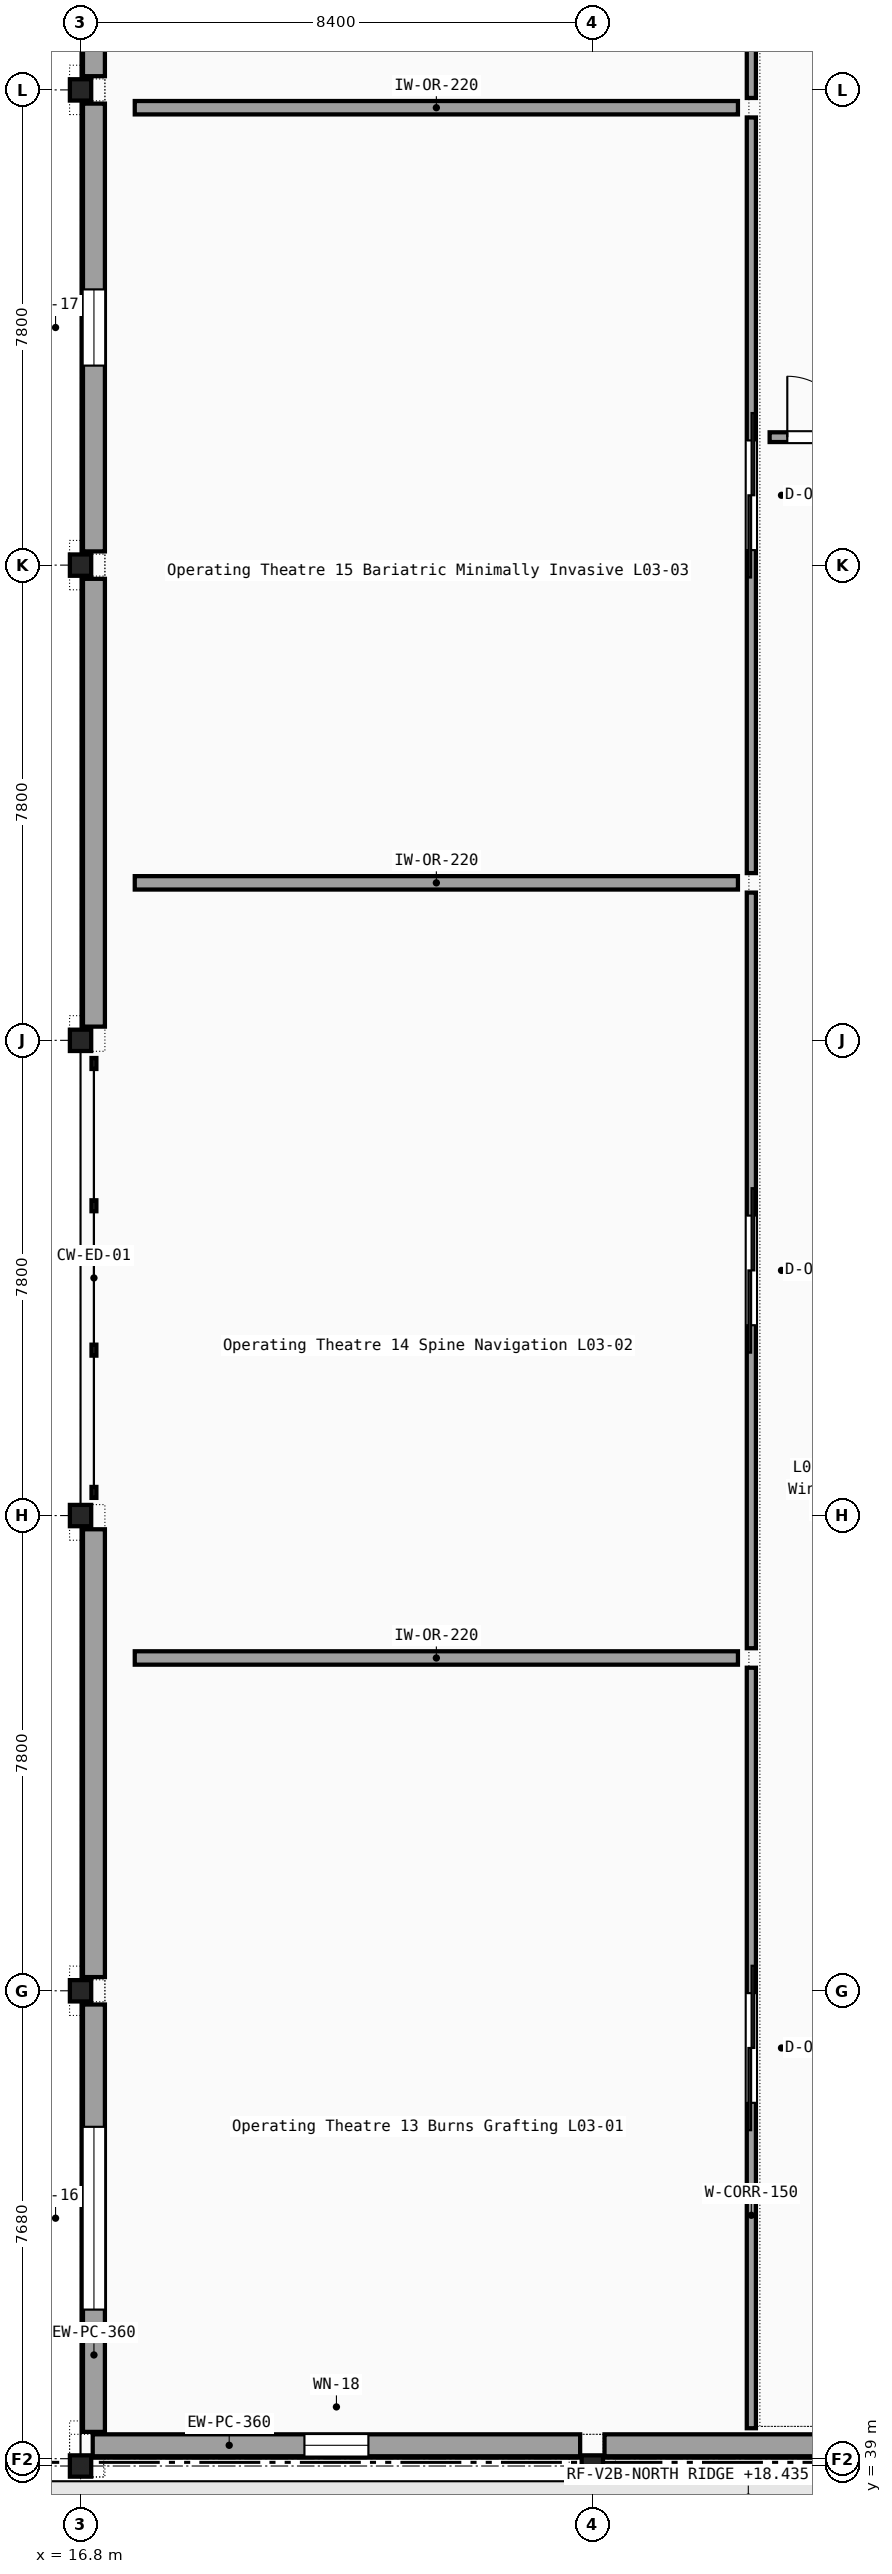
"""IFC4 building model, lengths in metres.
Left out: names, types, materials, properties, quantities, classifications, styles, units other than length and angle.
Written with IfcOpenShell. Run it as: python <this file> out.ifc"""

import sys

from ifc_helpers import new_model, si_unit, direction, frame, frame_2d, origin, origin_2d, place, context, subcontext, project, spatial, rectangle, i_section, extrude, element, fill, save


model = new_model("IFC4")
c1 = context("Model", 3, precision=1e-05, world=origin(), true_north=direction((0.0, 1.0)))
c2 = subcontext(c1, "Body", "Model", "MODEL_VIEW")
j1 = project(units=[si_unit("LENGTHUNIT", "METRE"), si_unit("PLANEANGLEUNIT", "RADIAN")], contexts=[c1])
p1 = place(None, origin())
s1 = spatial("IfcSite", under=j1, at=p1, CompositionType="ELEMENT")
p2 = place(p1, origin())
s2 = spatial("IfcBuilding", under=s1, at=p2, CompositionType="ELEMENT")
p3 = place(p2, frame((0.0, 0.0, 14.85)))
s3 = spatial("IfcBuildingStorey", under=s2, at=p3, CompositionType="ELEMENT", Elevation=14.85)
for number, where, z_axis, x_axis in (
    (1, (16.8, 39.0, 0.0), (0.0, 0.0, 1.0), (1.0, 0.0, 0.0)),
    (2, (16.8, 46.8, 0.0), (0.0, 0.0, 1.0), (1.0, 0.0, 0.0)),
    (3, (16.8, 54.6, 0.0), (0.0, 0.0, 1.0), (1.0, 0.0, 0.0)),
    (4, (16.8, 62.4, 0.0), (0.0, 0.0, 1.0), (1.0, 0.0, 0.0)),
    (5, (16.8, 70.2, 0.0), (0.0, 0.0, 1.0), (1.0, 0.0, 0.0)),
    (6, (16.8, 78.0, 0.0), (0.0, 0.0, 1.0), (1.0, 0.0, 0.0)),
    (7, (25.2, 39.0, 0.0), (0.0, 0.0, 1.0), (1.0, 0.0, 0.0)),
):
    element("IfcColumn", number, at=place(p3, frame(where, z_axis=z_axis, x_axis=x_axis)), inside=s3, PredefinedType="COLUMN", context=c2, shape_type="SweptSolid", body=[
        extrude(i_section(OverallWidth=0.3, OverallDepth=0.35, WebThickness=0.01, FlangeThickness=0.018, FilletRadius=0.027, at=origin_2d()), origin(), (0.0, 0.0, 1.0), 4.05),
    ])
p4 = place(p3, frame((17.02, 39.56, 0.0), z_axis=(0.0, 0.0, 1.0), x_axis=(0.0, 1.0, 0.0)))
e8 = element("IfcWall", 8, at=p4, inside=s3, PredefinedType="SOLIDWALL", context=c2, shape_type="SweptSolid", body=[
    extrude(rectangle(XDim=7.015, YDim=0.36, at=frame_2d((3.507, 0.0))), origin(), (0.0, 0.0, 1.0), 3.77),
])
p5 = place(p4, frame((2.008, 0.0, 0.7)))
e9 = element("IfcOpeningElement", 9, at=p5, cuts=e8, PredefinedType="OPENING", context=c2, shape_type="SweptSolid", body=[
    extrude(rectangle(XDim=3.0, YDim=1.85, at=frame_2d((1.5, 0.925))), frame((0.0, 0.19, 0.0), z_axis=(0.0, -1.0, 0.0), x_axis=(1.0, 0.0, 0.0)), (0.0, 0.0, 1.0), 0.38),
])
for number, where, z_axis, x_axis in (
    (10, (17.02, 47.025, 0.0), (0.0, 0.0, 1.0), (0.0, 1.0, 0.0)),
    (11, (17.02, 62.625, 0.0), (0.0, 0.0, 1.0), (0.0, 1.0, 0.0)),
):
    element("IfcWall", number, at=place(p3, frame(where, z_axis=z_axis, x_axis=x_axis)), inside=s3, PredefinedType="SOLIDWALL", context=c2, shape_type="SweptSolid", body=[
        extrude(rectangle(XDim=7.35, YDim=0.36, at=frame_2d((3.675, 0.0))), origin(), (0.0, 0.0, 1.0), 3.44),
    ])
p6 = place(p3, frame((17.02, 70.425, 0.0), z_axis=(0.0, 0.0, 1.0), x_axis=(0.0, 1.0, 0.0)))
e12 = element("IfcWall", 12, at=p6, inside=s3, PredefinedType="SOLIDWALL", context=c2, shape_type="SweptSolid", body=[
    extrude(rectangle(XDim=7.35, YDim=0.36, at=frame_2d((3.675, 0.0))), origin(), (0.0, 0.0, 1.0), 3.44),
])
p7 = place(p6, frame((3.05, 0.0, 0.95)))
e13 = element("IfcOpeningElement", 13, at=p7, cuts=e12, PredefinedType="OPENING", context=c2, shape_type="SweptSolid", body=[
    extrude(rectangle(XDim=1.25, YDim=1.5, at=frame_2d((0.625, 0.75))), frame((0.0, 0.19, 0.0), z_axis=(0.0, -1.0, 0.0), x_axis=(1.0, 0.0, 0.0)), (0.0, 0.0, 1.0), 0.38),
])
p8 = place(p3, frame((17.02, 78.225, 0.0), z_axis=(0.0, 0.0, 1.0), x_axis=(0.0, 1.0, 0.0)))
e14 = element("IfcWall", 14, at=p8, inside=s3, PredefinedType="SOLIDWALL", context=c2, shape_type="SweptSolid", body=[
    extrude(rectangle(XDim=7.35, YDim=0.36, at=frame_2d((3.675, 0.0))), origin(), (0.0, 0.0, 1.0), 3.77),
])
p9 = place(p3, frame((17.0, 39.34, 0.0), z_axis=(0.0, 0.0, 1.0), x_axis=(1.0, 0.0, 0.0)))
e15 = element("IfcWall", 15, at=p9, inside=s3, PredefinedType="SOLIDWALL", context=c2, shape_type="SweptSolid", body=[
    extrude(rectangle(XDim=8.0, YDim=0.36, at=frame_2d((4.0, 0.0))), origin(), (0.0, 0.0, 1.0), 3.77),
])
p10 = place(p9, frame((3.475, 0.0, 1.3)))
e16 = element("IfcOpeningElement", 16, at=p10, cuts=e15, PredefinedType="OPENING", context=c2, shape_type="SweptSolid", body=[
    extrude(rectangle(XDim=1.05, YDim=1.2, at=frame_2d((0.525, 0.6))), frame((0.0, 0.19, 0.0), z_axis=(0.0, -1.0, 0.0), x_axis=(1.0, 0.0, 0.0)), (0.0, 0.0, 1.0), 0.38),
])
p11 = place(p3, frame((25.4, 39.34, 0.0), z_axis=(0.0, 0.0, 1.0), x_axis=(1.0, 0.0, 0.0)))
e17 = element("IfcWall", 17, at=p11, inside=s3, PredefinedType="SOLIDWALL", context=c2, shape_type="SweptSolid", body=[
    extrude(rectangle(XDim=8.0, YDim=0.36, at=frame_2d((4.0, 0.0))), origin(), (0.0, 0.0, 1.0), 3.77),
])
p12 = place(p3, frame((27.81, 39.62, 0.0), z_axis=(0.0, 0.0, 1.0), x_axis=(0.0, 1.0, 0.0)))
e18 = element("IfcWall", 18, at=p12, inside=s3, PredefinedType="PARTITIONING", context=c2, shape_type="SweptSolid", body=[
    extrude(rectangle(XDim=12.482, YDim=0.15, at=frame_2d((6.241, 0.0))), origin(), (0.0, 0.0, 1.0), 3.77),
])
p13 = place(p12, frame((5.341, 0.0, 0.0)))
e19 = element("IfcOpeningElement", 19, at=p13, cuts=e18, PredefinedType="OPENING", context=c2, shape_type="SweptSolid", body=[
    extrude(rectangle(XDim=1.8, YDim=2.4, at=frame_2d((0.9, 1.2))), frame((0.0, 0.085, 0.0), z_axis=(0.0, -1.0, 0.0), x_axis=(1.0, 0.0, 0.0)), (0.0, 0.0, 1.0), 0.17),
])
p14 = place(p3, frame((17.69, 52.262, 0.0), z_axis=(0.0, 0.0, 1.0), x_axis=(1.0, 0.0, 0.0)))
e20 = element("IfcWall", 20, at=p14, inside=s3, PredefinedType="PARTITIONING", context=c2, shape_type="SweptSolid", body=[
    extrude(rectangle(XDim=9.9, YDim=0.22, at=frame_2d((4.95, 0.0))), origin(), (0.0, 0.0, 1.0), 3.77),
])
p15 = place(p3, frame((27.81, 52.423, 0.0), z_axis=(0.0, 0.0, 1.0), x_axis=(0.0, 1.0, 0.0)))
e21 = element("IfcWall", 21, at=p15, inside=s3, PredefinedType="PARTITIONING", context=c2, shape_type="SweptSolid", body=[
    extrude(rectangle(XDim=12.402, YDim=0.15, at=frame_2d((6.201, 0.0))), origin(), (0.0, 0.0, 1.0), 3.44),
])
p16 = place(p15, frame((5.301, 0.0, 0.0)))
e22 = element("IfcOpeningElement", 22, at=p16, cuts=e21, PredefinedType="OPENING", context=c2, shape_type="SweptSolid", body=[
    extrude(rectangle(XDim=1.8, YDim=2.4, at=frame_2d((0.9, 1.2))), frame((0.0, 0.085, 0.0), z_axis=(0.0, -1.0, 0.0), x_axis=(1.0, 0.0, 0.0)), (0.0, 0.0, 1.0), 0.17),
])
p17 = place(p3, frame((17.69, 64.985, 0.0), z_axis=(0.0, 0.0, 1.0), x_axis=(1.0, 0.0, 0.0)))
e23 = element("IfcWall", 23, at=p17, inside=s3, PredefinedType="PARTITIONING", context=c2, shape_type="SweptSolid", body=[
    extrude(rectangle(XDim=9.9, YDim=0.22, at=frame_2d((4.95, 0.0))), origin(), (0.0, 0.0, 1.0), 3.77),
])
p18 = place(p3, frame((27.81, 65.145, 0.0), z_axis=(0.0, 0.0, 1.0), x_axis=(0.0, 1.0, 0.0)))
e24 = element("IfcWall", 24, at=p18, inside=s3, PredefinedType="PARTITIONING", context=c2, shape_type="SweptSolid", body=[
    extrude(rectangle(XDim=12.403, YDim=0.15, at=frame_2d((6.201, 0.0))), origin(), (0.0, 0.0, 1.0), 3.44),
])
p19 = place(p18, frame((5.301, 0.0, 0.0)))
e25 = element("IfcOpeningElement", 25, at=p19, cuts=e24, PredefinedType="OPENING", context=c2, shape_type="SweptSolid", body=[
    extrude(rectangle(XDim=1.8, YDim=2.4, at=frame_2d((0.9, 1.2))), frame((0.0, 0.085, 0.0), z_axis=(0.0, -1.0, 0.0), x_axis=(1.0, 0.0, 0.0)), (0.0, 0.0, 1.0), 0.17),
])
p20 = place(p3, frame((17.69, 77.708, 0.0), z_axis=(0.0, 0.0, 1.0), x_axis=(1.0, 0.0, 0.0)))
e26 = element("IfcWall", 26, at=p20, inside=s3, PredefinedType="PARTITIONING", context=c2, shape_type="SweptSolid", body=[
    extrude(rectangle(XDim=9.9, YDim=0.22, at=frame_2d((4.95, 0.0))), origin(), (0.0, 0.0, 1.0), 3.77),
])
p21 = place(p3, frame((27.81, 77.867, 0.0), z_axis=(0.0, 0.0, 1.0), x_axis=(0.0, 1.0, 0.0)))
e27 = element("IfcWall", 27, at=p21, inside=s3, PredefinedType="PARTITIONING", context=c2, shape_type="SweptSolid", body=[
    extrude(rectangle(XDim=12.483, YDim=0.15, at=frame_2d((6.241, 0.0))), origin(), (0.0, 0.0, 1.0), 3.77),
])
p22 = place(p21, frame((5.341, 0.0, 0.0)))
e28 = element("IfcOpeningElement", 28, at=p22, cuts=e27, PredefinedType="OPENING", context=c2, shape_type="SweptSolid", body=[
    extrude(rectangle(XDim=1.8, YDim=2.4, at=frame_2d((0.9, 1.2))), frame((0.0, 0.085, 0.0), z_axis=(0.0, -1.0, 0.0), x_axis=(1.0, 0.0, 0.0)), (0.0, 0.0, 1.0), 0.17),
])
p23 = place(p3, frame((28.11, 72.3, 0.0), z_axis=(0.0, 0.0, 1.0), x_axis=(1.0, 0.0, 0.0)))
e29 = element("IfcWall", 29, at=p23, inside=s3, PredefinedType="PARTITIONING", context=c2, shape_type="SweptSolid", body=[
    extrude(rectangle(XDim=2.58, YDim=0.16, at=frame_2d((1.29, 0.0))), origin(), (0.0, 0.0, 1.0), 3.77),
])
p24 = place(p23, frame((0.29, 0.0, 0.0)))
e30 = element("IfcOpeningElement", 30, at=p24, cuts=e29, PredefinedType="OPENING", context=c2, shape_type="SweptSolid", body=[
    extrude(rectangle(XDim=2.0, YDim=2.3, at=frame_2d((1.0, 1.15))), frame((0.0, 0.09, 0.0), z_axis=(0.0, -1.0, 0.0), x_axis=(1.0, 0.0, 0.0)), (0.0, 0.0, 1.0), 0.18),
])
p25 = place(p5, origin())
e31 = element("IfcWindow", 31, at=p25, inside=s3, PartitioningType="SINGLE_PANEL", PredefinedType="WINDOW", context=c2, shape_type="SweptSolid", body=[
    extrude(rectangle(XDim=3.0, YDim=1.85, at=frame_2d((1.5, 0.925))), frame((0.0, 0.03, 0.0), z_axis=(0.0, -1.0, 0.0), x_axis=(1.0, 0.0, 0.0)), (0.0, 0.0, 1.0), 0.06),
])
fill(e9, e31)
p26 = place(p7, origin())
e32 = element("IfcWindow", 32, at=p26, inside=s3, PartitioningType="SINGLE_PANEL", PredefinedType="WINDOW", context=c2, shape_type="SweptSolid", body=[
    extrude(rectangle(XDim=1.25, YDim=1.5, at=frame_2d((0.625, 0.75))), frame((0.0, 0.03, 0.0), z_axis=(0.0, -1.0, 0.0), x_axis=(1.0, 0.0, 0.0)), (0.0, 0.0, 1.0), 0.06),
])
fill(e13, e32)
p27 = place(p10, origin())
e33 = element("IfcWindow", 33, at=p27, inside=s3, PartitioningType="SINGLE_PANEL", PredefinedType="WINDOW", context=c2, shape_type="SweptSolid", body=[
    extrude(rectangle(XDim=1.05, YDim=1.2, at=frame_2d((0.525, 0.6))), frame((0.0, 0.03, 0.0), z_axis=(0.0, -1.0, 0.0), x_axis=(1.0, 0.0, 0.0)), (0.0, 0.0, 1.0), 0.06),
])
fill(e16, e33)
p28 = place(p13, origin())
e34 = element("IfcDoor", 34, at=p28, inside=s3, OperationType="DOUBLE_DOOR_SLIDING", PredefinedType="DOOR", context=c2, shape_type="SweptSolid", body=[
    extrude(rectangle(XDim=1.8, YDim=2.4, at=frame_2d((0.9, 1.2))), frame((0.0, 0.025, 0.0), z_axis=(0.0, -1.0, 0.0), x_axis=(1.0, 0.0, 0.0)), (0.0, 0.0, 1.0), 0.05),
])
fill(e19, e34)
p29 = place(p16, origin())
e35 = element("IfcDoor", 35, at=p29, inside=s3, OperationType="DOUBLE_DOOR_SLIDING", PredefinedType="DOOR", context=c2, shape_type="SweptSolid", body=[
    extrude(rectangle(XDim=1.8, YDim=2.4, at=frame_2d((0.9, 1.2))), frame((0.0, 0.025, 0.0), z_axis=(0.0, -1.0, 0.0), x_axis=(1.0, 0.0, 0.0)), (0.0, 0.0, 1.0), 0.05),
])
fill(e22, e35)
p30 = place(p19, origin())
e36 = element("IfcDoor", 36, at=p30, inside=s3, OperationType="DOUBLE_DOOR_SLIDING", PredefinedType="DOOR", context=c2, shape_type="SweptSolid", body=[
    extrude(rectangle(XDim=1.8, YDim=2.4, at=frame_2d((0.9, 1.2))), frame((0.0, 0.025, 0.0), z_axis=(0.0, -1.0, 0.0), x_axis=(1.0, 0.0, 0.0)), (0.0, 0.0, 1.0), 0.05),
])
fill(e25, e36)
p31 = place(p24, origin())
e37 = element("IfcDoor", 37, at=p31, inside=s3, OperationType="DOUBLE_SWING_LEFT", PredefinedType="DOOR", context=c2, shape_type="SweptSolid", body=[
    extrude(rectangle(XDim=2.0, YDim=2.3, at=frame_2d((1.0, 1.15))), frame((0.0, 0.025, 0.0), z_axis=(0.0, -1.0, 0.0), x_axis=(1.0, 0.0, 0.0)), (0.0, 0.0, 1.0), 0.05),
])
fill(e30, e37)
save(model, sys.argv[1])
